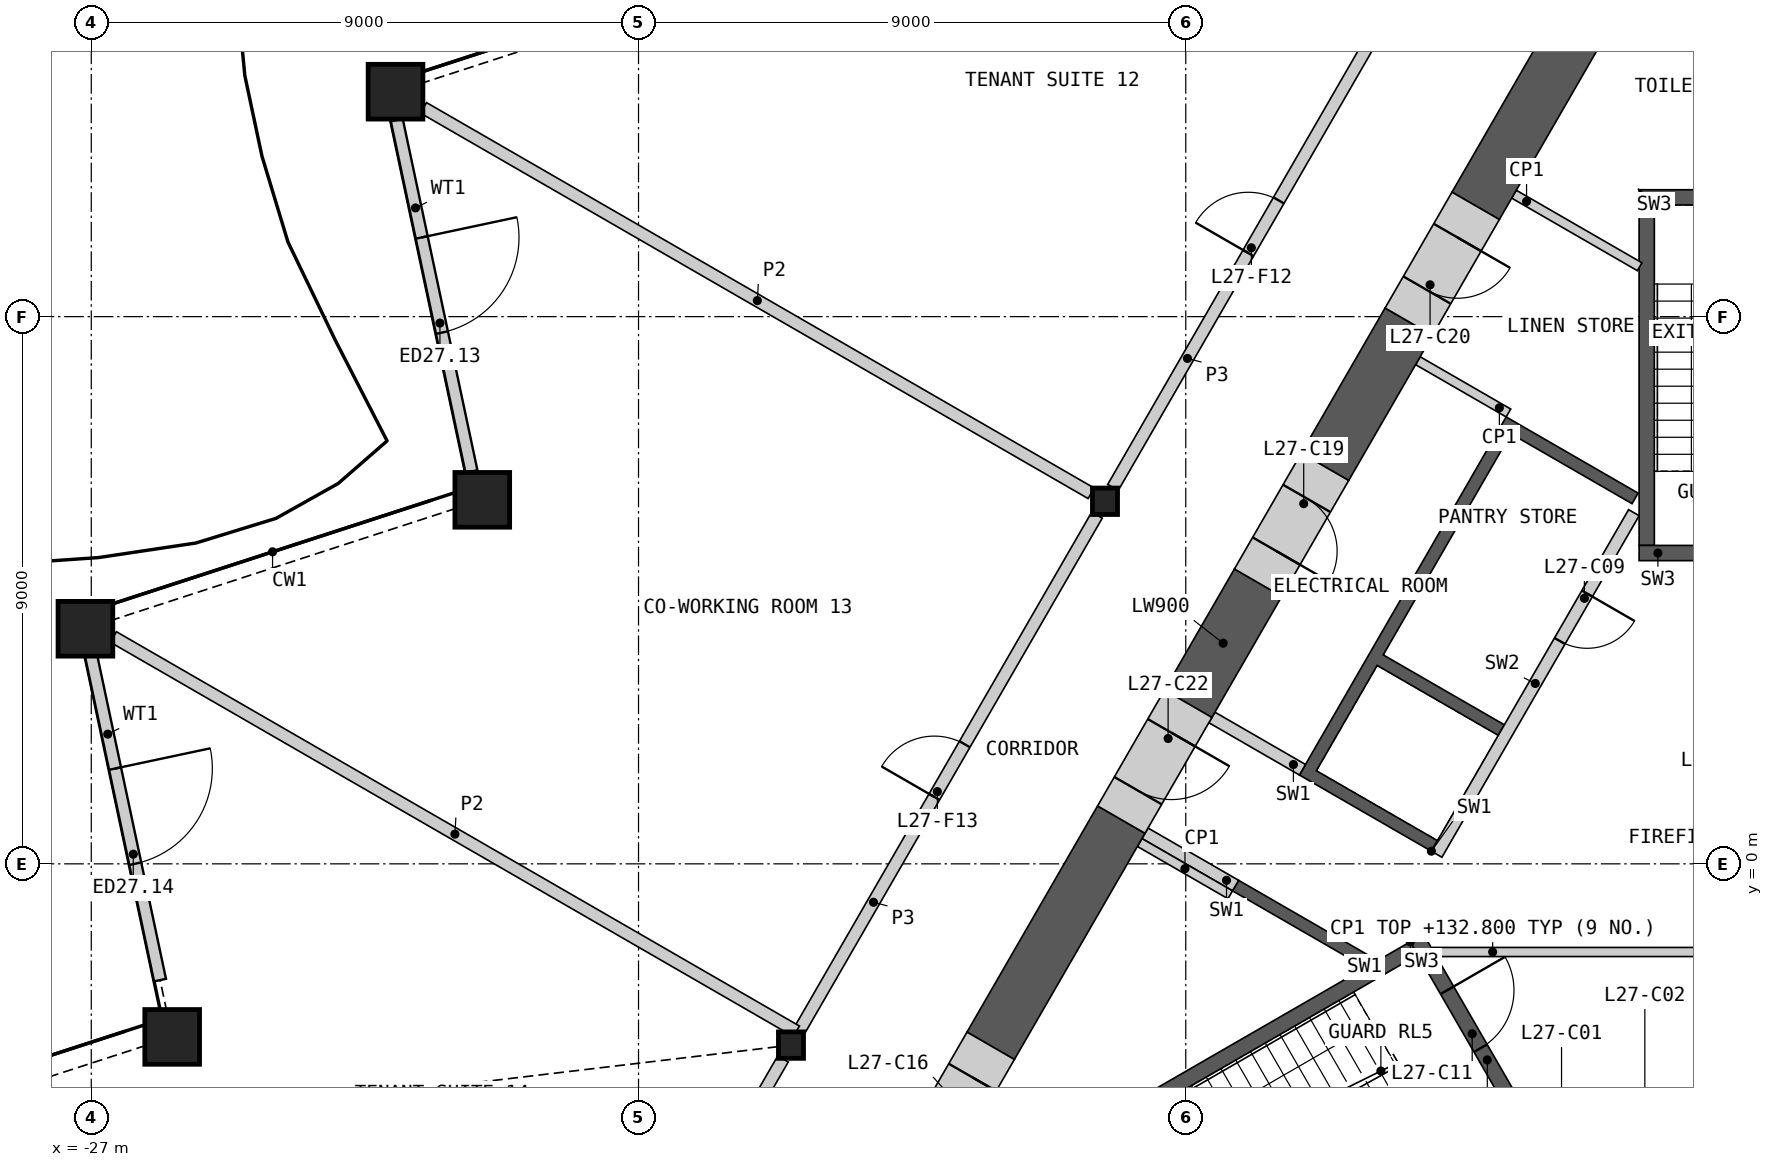
"""IFC4 building model, lengths in metres.
Left out: names, types, materials, properties, quantities, classifications, styles, units other than length and angle.
Written with IfcOpenShell. Run it as: python <this file> out.ifc"""

import sys

from ifc_helpers import new_model, si_unit, direction, frame, frame_2d, origin, origin_2d, place, context, subcontext, project, spatial, polyline, rectangle, hollow_rectangle, i_section, outline, extrude, element, fill, save


model = new_model("IFC4")
c1 = context("Model", 3, precision=1e-05, world=origin(), true_north=direction((0.0, 1.0)))
c2 = subcontext(c1, "Body", "Model", "MODEL_VIEW")
j1 = project(units=[si_unit("LENGTHUNIT", "METRE"), si_unit("PLANEANGLEUNIT", "RADIAN")], contexts=[c1])
p1 = place(None, origin())
s1 = spatial("IfcSite", under=j1, at=p1, CompositionType="ELEMENT")
p2 = place(p1, origin())
s2 = spatial("IfcBuilding", under=s1, at=p2, CompositionType="ELEMENT")
p3 = place(p2, frame((0.0, 0.0, 129.0)))
s3 = spatial("IfcBuildingStorey", under=s2, at=p3, CompositionType="ELEMENT", Elevation=129.0)
for number, where, z_axis, x_axis in (
    (1, (-21.996, 12.699, 0.0), (0.0, 0.0, 1.0), (1.0, 0.0, 0.0)),
    (2, (-20.57, 5.987, 0.0), (0.0, 0.0, 1.0), (1.0, 0.0, 0.0)),
    (3, (-27.096, 3.866, 0.0), (0.0, 0.0, 1.0), (1.0, 0.0, 0.0)),
    (4, (-25.669, -2.846, 0.0), (0.0, 0.0, 1.0), (1.0, 0.0, 0.0)),
):
    element("IfcColumn", number, at=place(p3, frame(where, z_axis=z_axis, x_axis=x_axis)), inside=s3, PredefinedType="COLUMN", context=c2, shape_type="SweptSolid", body=[
        extrude(hollow_rectangle(XDim=0.9, YDim=0.9, WallThickness=0.06, at=origin_2d()), origin(), (0.0, 0.0, 1.0), 4.2),
    ])
for number, where, z_axis, x_axis in (
    (5, (-10.328, 5.963, 0.0), (0.0, 0.0, 1.0), (1.0, 0.0, 0.0)),
    (6, (-15.493, -2.982, 0.0), (0.0, 0.0, 1.0), (1.0, 0.0, 0.0)),
):
    element("IfcColumn", number, at=place(p3, frame(where, z_axis=z_axis, x_axis=x_axis)), inside=s3, PredefinedType="COLUMN", context=c2, shape_type="SweptSolid", body=[
        extrude(i_section(OverallWidth=0.412, OverallDepth=0.435, WebThickness=0.036, FlangeThickness=0.057, at=origin_2d()), origin(), (0.0, 0.0, 1.0), 4.2),
    ])
p4 = place(p3, frame((-21.976, 12.233, 0.0), z_axis=(0.0, 0.0, 1.0), x_axis=(0.207925965623, -0.978144566421, 0.0)))
e7 = element("IfcWall", 7, at=p4, inside=s3, PredefinedType="SOLIDWALL", context=c2, shape_type="SweptSolid", body=[
    extrude(rectangle(XDim=5.908, YDim=0.2, at=frame_2d((2.954, 0.0))), origin(), (0.0, 0.0, 1.0), 3.189),
])
p5 = place(p4, frame((1.973, 0.0, 0.0)))
e8 = element("IfcOpeningElement", 8, at=p5, cuts=e7, PredefinedType="OPENING", context=c2, shape_type="SweptSolid", body=[
    extrude(rectangle(XDim=1.6, YDim=2.4, at=frame_2d((0.8, 1.2))), frame((0.0, 0.11, 0.0), z_axis=(0.0, -1.0, 0.0), x_axis=(1.0, 0.0, 0.0)), (0.0, 0.0, 1.0), 0.22),
])
p6 = place(p3, frame((-27.016, 3.482, 0.0), z_axis=(0.0, 0.0, 1.0), x_axis=(0.207902173992, -0.978149623549, 0.0)))
e9 = element("IfcWall", 9, at=p6, inside=s3, PredefinedType="SOLIDWALL", context=c2, shape_type="SweptSolid", body=[
    extrude(rectangle(XDim=5.515, YDim=0.2, at=frame_2d((2.757, 0.0))), origin(), (0.0, 0.0, 1.0), 3.189),
])
p7 = place(p6, frame((1.957, 0.0, 0.0)))
e10 = element("IfcOpeningElement", 10, at=p7, cuts=e9, PredefinedType="OPENING", context=c2, shape_type="SweptSolid", body=[
    extrude(rectangle(XDim=1.6, YDim=2.4, at=frame_2d((0.8, 1.2))), frame((0.0, 0.11, 0.0), z_axis=(0.0, -1.0, 0.0), x_axis=(1.0, 0.0, 0.0)), (0.0, 0.0, 1.0), 0.22),
])
p8 = place(p3, origin())
e11 = element("IfcWall", 11, at=p8, inside=s3, PredefinedType="SHEAR", context=c2, shape_type="SweptSolid", body=[
    extrude(outline(polyline([(-6.061, -1.697), (-8.231, -0.444), (-8.131, -0.271), (-5.96, -1.524), (-6.061, -1.697)])), origin(), (0.0, 0.0, 1.0), 3.8),
])
p9 = place(p3, origin())
e12 = element("IfcWall", 12, at=p9, inside=s3, PredefinedType="SHEAR", context=c2, shape_type="SweptSolid", body=[
    extrude(outline(polyline([(-4.96, 0.208), (-7.131, 1.461), (-3.731, 7.35), (-1.561, 6.097), (-1.66, 5.924), (-3.652, 7.074), (-5.752, 3.437), (-3.76, 2.287), (-3.861, 2.113), (-5.852, 3.263), (-6.852, 1.531), (-4.861, 0.381), (-4.96, 0.208)])), origin(), (0.0, 0.0, 1.0), 3.8),
])
p10 = place(p3, frame((-1.631, 5.776, 0.0), z_axis=(0.0, 0.0, 1.0), x_axis=(-0.499992876559, -0.866029516466, 0.0)))
e13 = element("IfcWall", 13, at=p10, inside=s3, PredefinedType="SOLIDWALL", context=c2, shape_type="SweptSolid", body=[
    extrude(rectangle(XDim=6.486, YDim=0.2, at=frame_2d((3.243, 0.0))), origin(), (0.0, 0.0, 1.0), 3.8),
])
p11 = place(p10, frame((1.537, 0.0, 0.0)))
e14 = element("IfcOpeningElement", 14, at=p11, cuts=e13, PredefinedType="OPENING", context=c2, shape_type="SweptSolid", body=[
    extrude(rectangle(XDim=0.9, YDim=2.1, at=frame_2d((0.45, 1.05))), frame((0.0, 0.11, 0.0), z_axis=(0.0, -1.0, 0.0), x_axis=(1.0, 0.0, 0.0)), (0.0, 0.0, 1.0), 0.22),
])
for number, where, z_axis, x_axis in (
    (15, (-7.081, 1.548, 0.0), (0.0, 0.0, 1.0), (-0.866, 0.5, 0.0)),
    (16, (-8.181, -0.357, 0.0), (0.0, 0.0, 1.0), (-0.866, 0.5, 0.0)),
):
    element("IfcWall", number, at=place(p3, frame(where, z_axis=z_axis, x_axis=x_axis)), inside=s3, PredefinedType="SHEAR", context=c2, shape_type="SweptSolid", body=[
        extrude(rectangle(XDim=1.72, YDim=0.2, at=frame_2d((0.86, 0.0))), origin(), (0.0, 0.0, 1.0), 3.8),
    ])
p12 = place(p3, frame((-4.941, -1.45, 0.0), z_axis=(0.0, 0.0, 1.0), x_axis=(1.0, 0.0, 0.0)))
e17 = element("IfcWall", 17, at=p12, inside=s3, PredefinedType="PARTITIONING", context=c2, shape_type="SweptSolid", body=[
    extrude(rectangle(XDim=9.882, YDim=0.15, at=frame_2d((4.941, 0.0))), origin(), (0.0, 0.0, 1.0), 3.8),
])
p13 = place(p12, frame((4.391, 0.0, 0.0)))
e18 = element("IfcOpeningElement", 18, at=p13, cuts=e17, PredefinedType="OPENING", context=c2, shape_type="SweptSolid", body=[
    extrude(rectangle(XDim=1.1, YDim=2.1, at=frame_2d((0.55, 1.05))), frame((0.0, 0.085, 0.0), z_axis=(0.0, -1.0, 0.0), x_axis=(1.0, 0.0, 0.0)), (0.0, 0.0, 1.0), 0.17),
])
p14 = place(p3, origin())
e19 = element("IfcWall", 19, at=p14, inside=s3, PredefinedType="SHEAR", context=c2, shape_type="SweptSolid", body=[
    extrude(outline(polyline([(-5.307, -1.281), (-10.374, -4.206), (-10.032, -4.298), (-5.182, -1.498), (-5.307, -1.281)])), origin(), (0.0, 0.0, 1.0), 3.8),
])
p15 = place(p3, frame((-5.199, -1.219, 0.0), z_axis=(0.0, 0.0, 1.0), x_axis=(0.499982516597, -0.866035497597, 0.0)))
e20 = element("IfcWall", 20, at=p15, inside=s3, PredefinedType="SHEAR", context=c2, shape_type="SweptSolid", body=[
    extrude(rectangle(XDim=3.088, YDim=0.25, at=frame_2d((1.544, 0.0))), origin(), (0.0, 0.0, 1.0), 3.8),
])
p16 = place(p15, frame((0.994, 0.0, 0.0)))
e21 = element("IfcOpeningElement", 21, at=p16, cuts=e20, PredefinedType="OPENING", context=c2, shape_type="SweptSolid", body=[
    extrude(rectangle(XDim=1.1, YDim=2.1, at=frame_2d((0.55, 1.05))), frame((0.0, 0.135, 0.0), z_axis=(0.0, -1.0, 0.0), x_axis=(1.0, 0.0, 0.0)), (0.0, 0.0, 1.0), 0.27),
])
p17 = place(p3, origin())
e22 = element("IfcWall", 22, at=p17, inside=s3, PredefinedType="SHEAR", context=c2, shape_type="SweptSolid", body=[
    extrude(outline(polyline([(1.544, 11.087), (-1.544, 11.087), (-1.294, 10.837), (1.294, 10.837), (1.544, 11.087)])), origin(), (0.0, 0.0, 1.0), 3.8),
])
p18 = place(p3, origin())
e23 = element("IfcWall", 23, at=p18, inside=s3, PredefinedType="SHEAR", context=c2, shape_type="SweptSolid", body=[
    extrude(outline(polyline([(-1.294, 10.837), (-1.544, 11.087), (-1.544, 5.237), (-1.294, 5.237), (-1.294, 10.837)])), origin(), (0.0, 0.0, 1.0), 3.8),
])
p19 = place(p3, frame((1.544, 5.112, 0.0), z_axis=(0.0, 0.0, 1.0), x_axis=(-1.0, 0.0, 0.0)))
e24 = element("IfcWall", 24, at=p19, inside=s3, PredefinedType="SHEAR", context=c2, shape_type="SweptSolid", body=[
    extrude(rectangle(XDim=3.088, YDim=0.25, at=frame_2d((1.544, 0.0))), origin(), (0.0, 0.0, 1.0), 3.8),
])
p20 = place(p19, frame((0.994, 0.0, 0.0)))
e25 = element("IfcOpeningElement", 25, at=p20, cuts=e24, PredefinedType="OPENING", context=c2, shape_type="SweptSolid", body=[
    extrude(rectangle(XDim=1.1, YDim=2.1, at=frame_2d((0.55, 1.05))), frame((0.0, 0.135, 0.0), z_axis=(0.0, -1.0, 0.0), x_axis=(1.0, 0.0, 0.0)), (0.0, 0.0, 1.0), 0.27),
])
for number, where, z_axis, x_axis in (
    (26, (-8.268, -0.509, 0.0), (0.0, 0.0, 1.0), (-0.866, 0.5, 0.0)),
    (27, (-3.693, 7.415, 0.0), (0.0, 0.0, 1.0), (-0.866, 0.5, 0.0)),
):
    element("IfcWall", number, at=place(p3, frame(where, z_axis=z_axis, x_axis=x_axis)), inside=s3, PredefinedType="PARTITIONING", context=c2, shape_type="SweptSolid", body=[
        extrude(rectangle(XDim=1.72, YDim=0.15, at=frame_2d((0.86, 0.0))), origin(), (0.0, 0.0, 1.0), 3.8),
    ])
p21 = place(p3, frame((-3.602, 11.014, 0.0), z_axis=(0.0, 0.0, 1.0), x_axis=(0.866011787705, -0.500023583, 0.0)))
e28 = element("IfcWall", 28, at=p21, inside=s3, PredefinedType="PARTITIONING", context=c2, shape_type="SweptSolid", body=[
    extrude(rectangle(XDim=2.386, YDim=0.15, at=frame_2d((1.193, 0.0))), origin(), (0.0, 0.0, 1.0), 3.8),
])
p22 = place(p3, frame((-0.39, 17.478, 0.0), z_axis=(0.0, 0.0, 1.0), x_axis=(-0.500010285023, -0.866019465642, 0.0)))
e29 = element("IfcWall", 29, at=p22, inside=s3, PredefinedType="SHEAR", context=c2, shape_type="SweptSolid", body=[
    extrude(rectangle(XDim=7.685, YDim=0.9, at=frame_2d((3.842, 0.0))), origin(), (0.0, 0.0, 1.0), 3.8),
])
p23 = place(p3, frame((-10.06, 0.728, 0.0), z_axis=(0.0, 0.0, 1.0), x_axis=(-0.499996331799, -0.866027521611, 0.0)))
e30 = element("IfcWall", 30, at=p23, inside=s3, PredefinedType="SHEAR", context=c2, shape_type="SweptSolid", body=[
    extrude(rectangle(XDim=4.295, YDim=0.9, at=frame_2d((2.148, 0.0))), origin(), (0.0, 0.0, 1.0), 3.8),
])
p24 = place(p3, frame((-5.332, 8.917, 0.0), z_axis=(0.0, 0.0, 1.0), x_axis=(-0.499949934511, -0.866054307178, 0.0)))
e31 = element("IfcWall", 31, at=p24, inside=s3, PredefinedType="SHEAR", context=c2, shape_type="SweptSolid", body=[
    extrude(rectangle(XDim=2.756, YDim=0.9, at=frame_2d((1.378, 0.0))), origin(), (0.0, 0.0, 1.0), 3.8),
])
p25 = place(p3, frame((-7.81, 4.625, 0.0), z_axis=(0.0, 0.0, 1.0), x_axis=(-0.499952165731, -0.866053019151, 0.0)))
e32 = element("IfcWall", 32, at=p25, inside=s3, PredefinedType="SHEAR", context=c2, shape_type="SweptSolid", body=[
    extrude(rectangle(XDim=2.3, YDim=0.9, at=frame_2d((1.15, 0.0))), origin(), (0.0, 0.0, 1.0), 3.8),
])
p26 = place(p3, frame((-12.208, -2.992, 0.0), z_axis=(0.0, 0.0, 1.0), x_axis=(-0.50002983664, -0.866008176907, 0.0)))
e33 = element("IfcWall", 33, at=p26, inside=s3, PredefinedType="SHEAR", context=c2, shape_type="SweptSolid", body=[
    extrude(rectangle(XDim=2.2, YDim=0.9, at=frame_2d((1.1, 0.0))), origin(), (0.0, 0.0, 1.0), 3.8),
])
p27 = place(p26, frame((0.6, 0.0, 0.0)))
e34 = element("IfcOpeningElement", 34, at=p27, cuts=e33, PredefinedType="OPENING", context=c2, shape_type="SweptSolid", body=[
    extrude(rectangle(XDim=1.0, YDim=2.1, at=frame_2d((0.5, 1.05))), frame((0.0, 0.46, 0.0), z_axis=(0.0, -1.0, 0.0), x_axis=(1.0, 0.0, 0.0)), (0.0, 0.0, 1.0), 0.92),
])
p28 = place(p3, frame((-6.71, 6.53, 0.0), z_axis=(0.0, 0.0, 1.0), x_axis=(-0.50002983664, -0.866008176907, 0.0)))
e35 = element("IfcWall", 35, at=p28, inside=s3, PredefinedType="SHEAR", context=c2, shape_type="SweptSolid", body=[
    extrude(rectangle(XDim=2.2, YDim=0.9, at=frame_2d((1.1, 0.0))), origin(), (0.0, 0.0, 1.0), 3.8),
])
p29 = place(p28, frame((0.6, 0.0, 0.0)))
e36 = element("IfcOpeningElement", 36, at=p29, cuts=e35, PredefinedType="OPENING", context=c2, shape_type="SweptSolid", body=[
    extrude(rectangle(XDim=1.0, YDim=2.1, at=frame_2d((0.5, 1.05))), frame((0.0, 0.46, 0.0), z_axis=(0.0, -1.0, 0.0), x_axis=(1.0, 0.0, 0.0)), (0.0, 0.0, 1.0), 0.92),
])
p30 = place(p3, frame((-4.232, 10.822, 0.0), z_axis=(0.0, 0.0, 1.0), x_axis=(-0.50002983664, -0.866008176907, 0.0)))
e37 = element("IfcWall", 37, at=p30, inside=s3, PredefinedType="SHEAR", context=c2, shape_type="SweptSolid", body=[
    extrude(rectangle(XDim=2.2, YDim=0.9, at=frame_2d((1.1, 0.0))), origin(), (0.0, 0.0, 1.0), 3.8),
])
p31 = place(p30, frame((0.6, 0.0, 0.0)))
e38 = element("IfcOpeningElement", 38, at=p31, cuts=e37, PredefinedType="OPENING", context=c2, shape_type="SweptSolid", body=[
    extrude(rectangle(XDim=1.0, YDim=2.1, at=frame_2d((0.5, 1.05))), frame((0.0, 0.46, 0.0), z_axis=(0.0, -1.0, 0.0), x_axis=(1.0, 0.0, 0.0)), (0.0, 0.0, 1.0), 0.92),
])
p32 = place(p3, frame((-8.96, 2.633, 0.0), z_axis=(0.0, 0.0, 1.0), x_axis=(-0.50002983664, -0.866008176907, 0.0)))
e39 = element("IfcWall", 39, at=p32, inside=s3, PredefinedType="SHEAR", context=c2, shape_type="SweptSolid", body=[
    extrude(rectangle(XDim=2.2, YDim=0.9, at=frame_2d((1.1, 0.0))), origin(), (0.0, 0.0, 1.0), 3.8),
])
p33 = place(p32, frame((0.55, 0.0, 0.0)))
e40 = element("IfcOpeningElement", 40, at=p33, cuts=e39, PredefinedType="OPENING", context=c2, shape_type="SweptSolid", body=[
    extrude(rectangle(XDim=1.1, YDim=2.1, at=frame_2d((0.55, 1.05))), frame((0.0, 0.46, 0.0), z_axis=(0.0, -1.0, 0.0), x_axis=(1.0, 0.0, 0.0)), (0.0, 0.0, 1.0), 0.92),
])
p34 = place(p3, frame((-15.361, -2.754, 0.0), z_axis=(0.0, 0.0, 1.0), x_axis=(0.500004141693, 0.866023012564, 0.0)))
e41 = element("IfcWall", 41, at=p34, inside=s3, PredefinedType="PARTITIONING", context=c2, shape_type="SweptSolid", body=[
    extrude(rectangle(XDim=9.803, YDim=0.2, at=frame_2d((4.902, 0.0))), origin(), (0.0, 0.0, 1.0), 3.8),
])
p35 = place(p34, frame((4.452, 0.0, 0.0)))
e42 = element("IfcOpeningElement", 42, at=p35, cuts=e41, PredefinedType="OPENING", context=c2, shape_type="SweptSolid", body=[
    extrude(rectangle(XDim=1.0, YDim=2.1, at=frame_2d((0.5, 1.05))), frame((0.0, 0.11, 0.0), z_axis=(0.0, -1.0, 0.0), x_axis=(1.0, 0.0, 0.0)), (0.0, 0.0, 1.0), 0.22),
])
p36 = place(p3, frame((-10.197, 6.19, 0.0), z_axis=(0.0, 0.0, 1.0), x_axis=(0.500012035596, 0.866018454918, 0.0)))
e43 = element("IfcWall", 43, at=p36, inside=s3, PredefinedType="PARTITIONING", context=c2, shape_type="SweptSolid", body=[
    extrude(rectangle(XDim=9.803, YDim=0.2, at=frame_2d((4.902, 0.0))), origin(), (0.0, 0.0, 1.0), 3.8),
])
p37 = place(p36, frame((4.452, 0.0, 0.0)))
e44 = element("IfcOpeningElement", 44, at=p37, cuts=e43, PredefinedType="OPENING", context=c2, shape_type="SweptSolid", body=[
    extrude(rectangle(XDim=1.0, YDim=2.1, at=frame_2d((0.5, 1.05))), frame((0.0, 0.11, 0.0), z_axis=(0.0, -1.0, 0.0), x_axis=(1.0, 0.0, 0.0)), (0.0, 0.0, 1.0), 0.22),
])
p38 = place(p3, frame((-18.744, -8.613, 0.0), z_axis=(0.0, 0.0, 1.0), x_axis=(0.499997920671, 0.866026604282, 0.0)))
e45 = element("IfcWall", 45, at=p38, inside=s3, PredefinedType="PARTITIONING", context=c2, shape_type="SweptSolid", body=[
    extrude(rectangle(XDim=6.24, YDim=0.2, at=frame_2d((3.12, 0.0))), origin(), (0.0, 0.0, 1.0), 3.8),
])
p39 = place(p38, frame((2.67, 0.0, 0.0)))
e46 = element("IfcOpeningElement", 46, at=p39, cuts=e45, PredefinedType="OPENING", context=c2, shape_type="SweptSolid", body=[
    extrude(rectangle(XDim=1.0, YDim=2.1, at=frame_2d((0.5, 1.05))), frame((0.0, 0.11, 0.0), z_axis=(0.0, -1.0, 0.0), x_axis=(1.0, 0.0, 0.0)), (0.0, 0.0, 1.0), 0.22),
])
p40 = place(p3, frame((-26.636, 3.731, 0.0), z_axis=(0.0, 0.0, 1.0), x_axis=(0.866024473704, -0.500001610943, 0.0)))
e47 = element("IfcWall", 47, at=p40, inside=s3, PredefinedType="PARTITIONING", context=c2, shape_type="SweptSolid", body=[
    extrude(rectangle(XDim=12.971, YDim=0.2, at=frame_2d((6.485, 0.0))), origin(), (0.0, 0.0, 1.0), 2.885),
])
p41 = place(p3, frame((-21.536, 12.434, 0.0), z_axis=(0.0, 0.0, 1.0), x_axis=(0.86602461759, -0.500001361726, 0.0)))
e48 = element("IfcWall", 48, at=p41, inside=s3, PredefinedType="PARTITIONING", context=c2, shape_type="SweptSolid", body=[
    extrude(rectangle(XDim=12.679, YDim=0.2, at=frame_2d((6.34, 0.0))), origin(), (0.0, 0.0, 1.0), 2.885),
])
p42 = place(p5, origin())
e49 = element("IfcDoor", 49, at=p42, inside=s3, OperationType="DOUBLE_DOOR_SINGLE_SWING", PredefinedType="DOOR", context=c2, shape_type="SweptSolid", body=[
    extrude(rectangle(XDim=1.6, YDim=2.4, at=frame_2d((0.8, 1.2))), frame((0.0, 0.025, 0.0), z_axis=(0.0, -1.0, 0.0), x_axis=(1.0, 0.0, 0.0)), (0.0, 0.0, 1.0), 0.05),
])
fill(e8, e49)
p43 = place(p7, origin())
e50 = element("IfcDoor", 50, at=p43, inside=s3, OperationType="DOUBLE_DOOR_SINGLE_SWING", PredefinedType="DOOR", context=c2, shape_type="SweptSolid", body=[
    extrude(rectangle(XDim=1.6, YDim=2.4, at=frame_2d((0.8, 1.2))), frame((0.0, 0.025, 0.0), z_axis=(0.0, -1.0, 0.0), x_axis=(1.0, 0.0, 0.0)), (0.0, 0.0, 1.0), 0.05),
])
fill(e10, e50)
p44 = place(p11, origin())
e51 = element("IfcDoor", 51, at=p44, inside=s3, OperationType="SINGLE_SWING_LEFT", PredefinedType="DOOR", context=c2, shape_type="SweptSolid", body=[
    extrude(rectangle(XDim=0.9, YDim=2.1, at=frame_2d((0.45, 1.05))), frame((0.0, 0.025, 0.0), z_axis=(0.0, -1.0, 0.0), x_axis=(1.0, 0.0, 0.0)), (0.0, 0.0, 1.0), 0.05),
])
fill(e14, e51)
p45 = place(p16, origin())
e52 = element("IfcDoor", 52, at=p45, inside=s3, OperationType="SINGLE_SWING_LEFT", PredefinedType="DOOR", context=c2, shape_type="SweptSolid", body=[
    extrude(rectangle(XDim=1.1, YDim=2.1, at=frame_2d((0.55, 1.05))), frame((0.0, 0.025, 0.0), z_axis=(0.0, -1.0, 0.0), x_axis=(1.0, 0.0, 0.0)), (0.0, 0.0, 1.0), 0.05),
])
fill(e21, e52)
p46 = place(p27, origin())
e53 = element("IfcDoor", 53, at=p46, inside=s3, OperationType="SINGLE_SWING_LEFT", PredefinedType="DOOR", context=c2, shape_type="SweptSolid", body=[
    extrude(rectangle(XDim=1.0, YDim=2.1, at=frame_2d((0.5, 1.05))), frame((0.0, 0.205, 0.0), z_axis=(0.0, -1.0, 0.0), x_axis=(1.0, 0.0, 0.0)), (0.0, 0.0, 1.0), 0.05),
])
fill(e34, e53)
p47 = place(p29, origin())
e54 = element("IfcDoor", 54, at=p47, inside=s3, OperationType="SINGLE_SWING_RIGHT", PredefinedType="DOOR", context=c2, shape_type="SweptSolid", body=[
    extrude(rectangle(XDim=1.0, YDim=2.1, at=frame_2d((0.5, 1.05))), frame((0.0, 0.205, 0.0), z_axis=(0.0, -1.0, 0.0), x_axis=(1.0, 0.0, 0.0)), (0.0, 0.0, 1.0), 0.05),
])
fill(e36, e54)
p48 = place(p31, origin())
e55 = element("IfcDoor", 55, at=p48, inside=s3, OperationType="SINGLE_SWING_LEFT", PredefinedType="DOOR", context=c2, shape_type="SweptSolid", body=[
    extrude(rectangle(XDim=1.0, YDim=2.1, at=frame_2d((0.5, 1.05))), frame((0.0, 0.205, 0.0), z_axis=(0.0, -1.0, 0.0), x_axis=(1.0, 0.0, 0.0)), (0.0, 0.0, 1.0), 0.05),
])
fill(e38, e55)
p49 = place(p33, origin())
e56 = element("IfcDoor", 56, at=p49, inside=s3, OperationType="SINGLE_SWING_LEFT", PredefinedType="DOOR", context=c2, shape_type="SweptSolid", body=[
    extrude(rectangle(XDim=1.1, YDim=2.1, at=frame_2d((0.55, 1.05))), frame((0.0, 0.205, 0.0), z_axis=(0.0, -1.0, 0.0), x_axis=(1.0, 0.0, 0.0)), (0.0, 0.0, 1.0), 0.05),
])
fill(e40, e56)
p50 = place(p37, origin())
e57 = element("IfcDoor", 57, at=p50, inside=s3, OperationType="SINGLE_SWING_LEFT", PredefinedType="DOOR", context=c2, shape_type="SweptSolid", body=[
    extrude(rectangle(XDim=1.0, YDim=2.1, at=frame_2d((0.5, 1.05))), frame((0.0, 0.025, 0.0), z_axis=(0.0, -1.0, 0.0), x_axis=(1.0, 0.0, 0.0)), (0.0, 0.0, 1.0), 0.05),
])
fill(e44, e57)
p51 = place(p35, origin())
e58 = element("IfcDoor", 58, at=p51, inside=s3, OperationType="SINGLE_SWING_LEFT", PredefinedType="DOOR", context=c2, shape_type="SweptSolid", body=[
    extrude(rectangle(XDim=1.0, YDim=2.1, at=frame_2d((0.5, 1.05))), frame((0.0, 0.025, 0.0), z_axis=(0.0, -1.0, 0.0), x_axis=(1.0, 0.0, 0.0)), (0.0, 0.0, 1.0), 0.05),
])
fill(e42, e58)
save(model, sys.argv[1])
